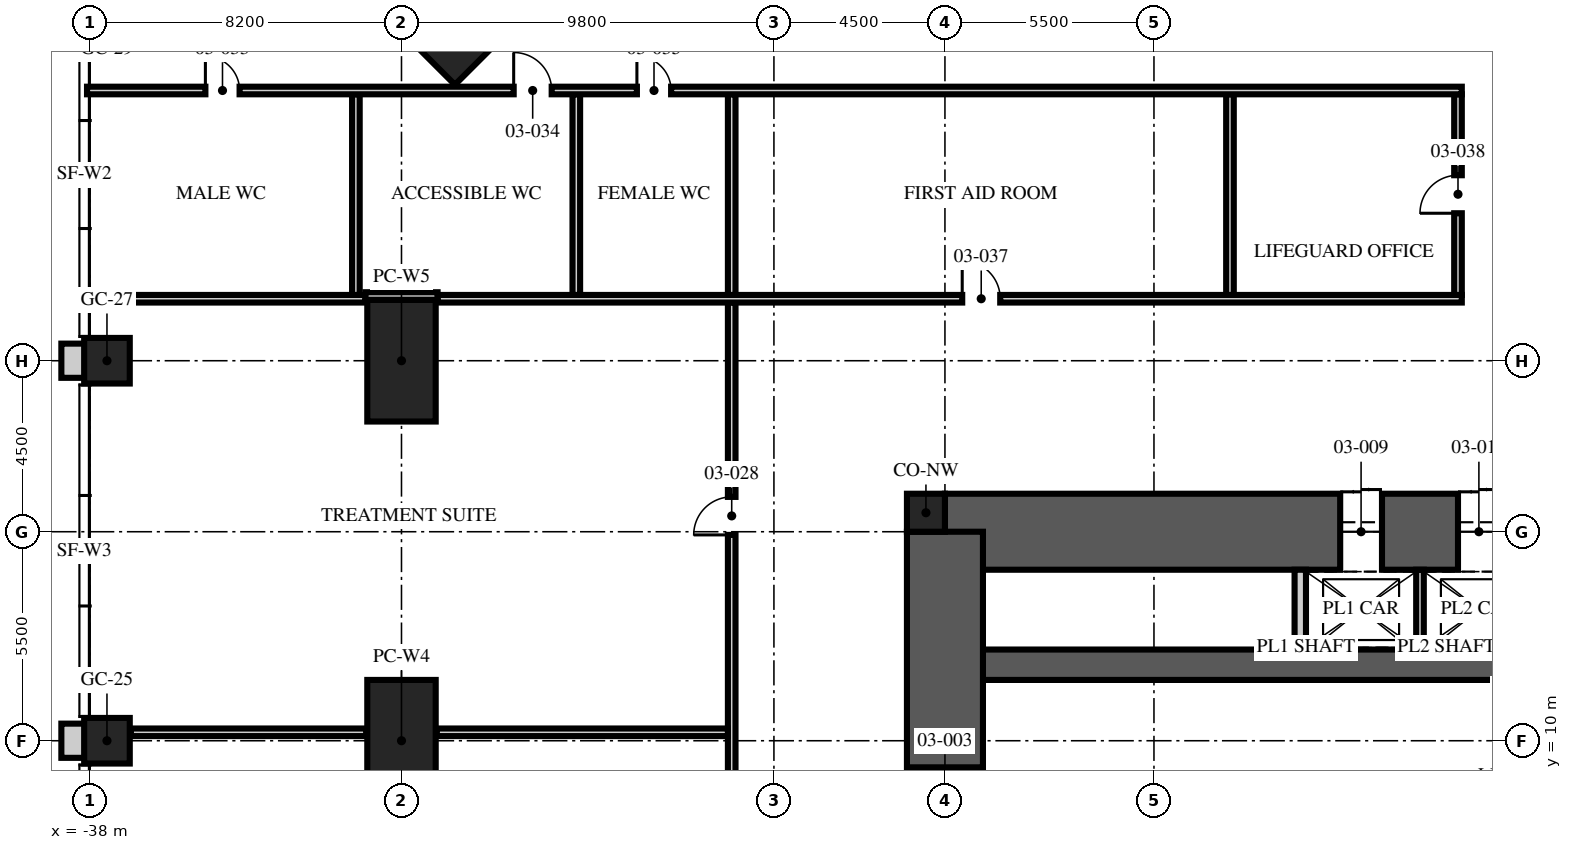
"""IFC4 building model, lengths in metres.
Left out: names, types, materials, properties, quantities, classifications, styles, units other than length and angle.
Written with IfcOpenShell. Run it as: python <this file> out.ifc"""

import sys

from ifc_helpers import new_model, si_unit, direction, frame, frame_2d, origin, origin_2d, place, context, subcontext, project, spatial, rectangle, hollow_rectangle, extrude, element, fill, save


model = new_model("IFC4")
c1 = context("Model", 3, precision=1e-05, world=origin(), true_north=direction((0.0, 1.0)))
c2 = subcontext(c1, "Body", "Model", "MODEL_VIEW")
j1 = project(units=[si_unit("LENGTHUNIT", "METRE"), si_unit("PLANEANGLEUNIT", "RADIAN")], contexts=[c1])
p1 = place(None, origin())
s1 = spatial("IfcSite", under=j1, at=p1, CompositionType="ELEMENT")
p2 = place(p1, origin())
s2 = spatial("IfcBuilding", under=s1, at=p2, CompositionType="ELEMENT")
p3 = place(p2, frame((0.0, 0.0, 16.0)))
s3 = spatial("IfcBuildingStorey", under=s2, at=p3, CompositionType="ELEMENT", Elevation=16.0)
p4 = place(p3, frame((-15.5, 15.5, -0.3), z_axis=(0.0, 0.0, 1.0), x_axis=(1.0, 0.0, 0.0)))
e1 = element("IfcWall", 1, at=p4, inside=s3, PredefinedType="SHEAR", context=c2, shape_type="SweptSolid", body=[
    extrude(rectangle(XDim=31.0, YDim=2.0, at=frame_2d((15.5, 0.0))), origin(), (0.0, 0.0, 1.0), 5.05),
])
p5 = place(p4, frame((10.4, 0.0, 0.3)))
e2 = element("IfcOpeningElement", 2, at=p5, cuts=e1, PredefinedType="OPENING", context=c2, shape_type="SweptSolid", body=[
    extrude(rectangle(XDim=1.1, YDim=2.1, at=frame_2d((0.55, 1.05))), frame((0.0, 1.01, 0.0), z_axis=(0.0, -1.0, 0.0), x_axis=(1.0, 0.0, 0.0)), (0.0, 0.0, 1.0), 2.02),
])
p6 = place(p4, frame((13.5, 0.0, 0.3)))
e3 = element("IfcOpeningElement", 3, at=p6, cuts=e1, PredefinedType="OPENING", context=c2, shape_type="SweptSolid", body=[
    extrude(rectangle(XDim=1.1, YDim=2.1, at=frame_2d((0.55, 1.05))), frame((0.0, 1.01, 0.0), z_axis=(0.0, -1.0, 0.0), x_axis=(1.0, 0.0, 0.0)), (0.0, 0.0, 1.0), 2.02),
])
p7 = place(p4, frame((16.6, 0.0, 0.3)))
e4 = element("IfcOpeningElement", 4, at=p7, cuts=e1, PredefinedType="OPENING", context=c2, shape_type="SweptSolid", body=[
    extrude(rectangle(XDim=1.1, YDim=2.1, at=frame_2d((0.55, 1.05))), frame((0.0, 1.01, 0.0), z_axis=(0.0, -1.0, 0.0), x_axis=(1.0, 0.0, 0.0)), (0.0, 0.0, 1.0), 2.02),
])
p8 = place(p3, frame((-15.5, 12.0, -0.3), z_axis=(0.0, 0.0, 1.0), x_axis=(1.0, 0.0, 0.0)))
e5 = element("IfcWall", 5, at=p8, inside=s3, PredefinedType="SHEAR", context=c2, shape_type="SweptSolid", body=[
    extrude(rectangle(XDim=31.0, YDim=0.8, at=frame_2d((15.5, 0.0))), origin(), (0.0, 0.0, 1.0), 5.05),
])
p9 = place(p3, frame((-15.5, -15.5, -0.3), z_axis=(0.0, 0.0, 1.0), x_axis=(0.0, 1.0, 0.0)))
e6 = element("IfcWall", 6, at=p9, inside=s3, PredefinedType="SHEAR", context=c2, shape_type="SweptSolid", body=[
    extrude(rectangle(XDim=31.0, YDim=2.0, at=frame_2d((15.5, 0.0))), origin(), (0.0, 0.0, 1.0), 5.05),
])
p10 = place(p9, frame((6.5, 0.0, 0.3)))
e7 = element("IfcOpeningElement", 7, at=p10, cuts=e6, PredefinedType="OPENING", context=c2, shape_type="SweptSolid", body=[
    extrude(rectangle(XDim=1.2, YDim=2.1, at=frame_2d((0.6, 1.05))), frame((0.0, 1.01, 0.0), z_axis=(0.0, -1.0, 0.0), x_axis=(1.0, 0.0, 0.0)), (0.0, 0.0, 1.0), 2.02),
])
p11 = place(p9, frame((23.0, 0.0, 0.3)))
e8 = element("IfcOpeningElement", 8, at=p11, cuts=e6, PredefinedType="OPENING", context=c2, shape_type="SweptSolid", body=[
    extrude(rectangle(XDim=1.8, YDim=2.1, at=frame_2d((0.9, 1.05))), frame((0.0, 1.01, 0.0), z_axis=(0.0, -1.0, 0.0), x_axis=(1.0, 0.0, 0.0)), (0.0, 0.0, 1.0), 2.02),
])
p12 = place(p3, frame((-16.0, 16.0, -0.3), z_axis=(0.0, 0.0, 1.0), x_axis=(1.0, 0.0, 0.0)))
e9 = element("IfcColumn", 9, at=p12, inside=s3, PredefinedType="COLUMN", context=c2, shape_type="SweptSolid", body=[
    extrude(rectangle(XDim=1.0, YDim=1.0, at=origin_2d()), origin(), (0.0, 0.0, 1.0), 5.05),
])
for number, where, z_axis, x_axis in (
    (10, (-29.8, 10.0, 0.0), (0.0, 0.0, 1.0), (0.0, 1.0, 0.0)),
    (11, (-29.8, 20.0, 0.0), (0.0, 0.0, 1.0), (0.0, 1.0, 0.0)),
):
    element("IfcColumn", number, at=place(p3, frame(where, z_axis=z_axis, x_axis=x_axis)), inside=s3, PredefinedType="COLUMN", context=c2, shape_type="SweptSolid", body=[
        extrude(hollow_rectangle(XDim=3.2, YDim=1.8, WallThickness=0.2, at=origin_2d()), origin(), (0.0, 0.0, 1.0), 5.0),
    ])
p13 = place(p3, frame((-28.394, 28.394, 0.0), z_axis=(0.0, 0.0, 1.0), x_axis=(0.707106781187, 0.707106781187, 0.0)))
e12 = element("IfcColumn", 12, at=p13, inside=s3, PredefinedType="COLUMN", context=c2, shape_type="SweptSolid", body=[
    extrude(hollow_rectangle(XDim=1.6, YDim=1.6, WallThickness=0.1, at=origin_2d()), origin(), (0.0, 0.0, 1.0), 5.0),
])
for number, where, z_axis, x_axis in (
    (13, (-37.55, 10.0, 0.0), (0.0, 0.0, 1.0), (1.0, 0.0, 0.0)),
    (14, (-37.55, 20.0, 0.0), (0.0, 0.0, 1.0), (1.0, 0.0, 0.0)),
):
    element("IfcColumn", number, at=place(p3, frame(where, z_axis=z_axis, x_axis=x_axis)), inside=s3, PredefinedType="COLUMN", context=c2, shape_type="SweptSolid", body=[
        extrude(rectangle(XDim=1.2, YDim=1.2, at=origin_2d()), origin(), (0.0, 0.0, 1.0), 5.0),
    ])
for number, where, z_axis, x_axis in (
    (15, (-38.375, 20.45, 0.0), (0.0, 0.0, 1.0), (0.0, -1.0, 0.0)),
    (16, (-38.375, 10.45, 0.0), (0.0, 0.0, 1.0), (0.0, -1.0, 0.0)),
):
    element("IfcWall", number, at=place(p3, frame(where, z_axis=z_axis, x_axis=x_axis)), inside=s3, PredefinedType="SOLIDWALL", context=c2, shape_type="SweptSolid", body=[
        extrude(rectangle(XDim=0.9, YDim=0.75, at=frame_2d((0.45, 0.0))), origin(), (0.0, 0.0, 1.0), 5.0),
    ])
p14 = place(p3, frame((-6.15, 12.4, 0.0), z_axis=(0.0, 0.0, 1.0), x_axis=(0.0, 1.0, 0.0)))
e17 = element("IfcWall", 17, at=p14, inside=s3, PredefinedType="PARTITIONING", context=c2, shape_type="SweptSolid", body=[
    extrude(rectangle(XDim=2.1, YDim=0.3, at=frame_2d((1.05, 0.0))), origin(), (0.0, 0.0, 1.0), 4.75),
])
p15 = place(p3, frame((-3.0, 12.4, 0.0), z_axis=(0.0, 0.0, 1.0), x_axis=(0.0, 1.0, 0.0)))
e18 = element("IfcWall", 18, at=p15, inside=s3, PredefinedType="PARTITIONING", context=c2, shape_type="SweptSolid", body=[
    extrude(rectangle(XDim=2.1, YDim=0.2, at=frame_2d((1.05, 0.0))), origin(), (0.0, 0.0, 1.0), 4.75),
])
p16 = place(p3, frame((-21.111, -20.491, 0.0), z_axis=(0.0, 0.0, 1.0), x_axis=(0.0, 1.0, 0.0)))
e19 = element("IfcWall", 19, at=p16, inside=s3, PredefinedType="SOLIDWALL", context=c2, shape_type="SweptSolid", body=[
    extrude(rectangle(XDim=42.022, YDim=0.2, at=frame_2d((21.011, 0.0))), origin(), (0.0, 0.0, 1.0), 3.55),
])
p17 = place(p16, frame((3.613, 0.0, 0.0)))
e20 = element("IfcOpeningElement", 20, at=p17, cuts=e19, PredefinedType="OPENING", context=c2, shape_type="SweptSolid", body=[
    extrude(rectangle(XDim=1.0, YDim=2.1, at=frame_2d((0.5, 1.05))), frame((0.0, 0.11, 0.0), z_axis=(0.0, -1.0, 0.0), x_axis=(1.0, 0.0, 0.0)), (0.0, 0.0, 1.0), 0.22),
])
p18 = place(p16, frame((13.314, 0.0, 0.0)))
e21 = element("IfcOpeningElement", 21, at=p18, cuts=e19, PredefinedType="OPENING", context=c2, shape_type="SweptSolid", body=[
    extrude(rectangle(XDim=1.0, YDim=2.1, at=frame_2d((0.5, 1.05))), frame((0.0, 0.11, 0.0), z_axis=(0.0, -1.0, 0.0), x_axis=(1.0, 0.0, 0.0)), (0.0, 0.0, 1.0), 0.22),
])
p19 = place(p16, frame((24.499, 0.0, 0.0)))
e22 = element("IfcOpeningElement", 22, at=p19, cuts=e19, PredefinedType="OPENING", context=c2, shape_type="SweptSolid", body=[
    extrude(rectangle(XDim=1.0, YDim=2.1, at=frame_2d((0.5, 1.05))), frame((0.0, 0.11, 0.0), z_axis=(0.0, -1.0, 0.0), x_axis=(1.0, 0.0, 0.0)), (0.0, 0.0, 1.0), 0.22),
])
p20 = place(p16, frame((35.907, 0.0, 0.0)))
e23 = element("IfcOpeningElement", 23, at=p20, cuts=e19, PredefinedType="OPENING", context=c2, shape_type="SweptSolid", body=[
    extrude(rectangle(XDim=1.0, YDim=2.1, at=frame_2d((0.5, 1.05))), frame((0.0, 0.11, 0.0), z_axis=(0.0, -1.0, 0.0), x_axis=(1.0, 0.0, 0.0)), (0.0, 0.0, 1.0), 0.22),
])
p21 = place(p3, frame((-36.92, 10.222, 0.0), z_axis=(0.0, 0.0, 1.0), x_axis=(1.0, 0.0, 0.0)))
e24 = element("IfcWall", 24, at=p21, inside=s3, PredefinedType="SOLIDWALL", context=c2, shape_type="SweptSolid", body=[
    extrude(rectangle(XDim=6.19, YDim=0.2, at=frame_2d((3.095, 0.0))), origin(), (0.0, 0.0, 1.0), 3.65),
])
p22 = place(p3, frame((-28.87, 10.222, 0.0), z_axis=(0.0, 0.0, 1.0), x_axis=(1.0, 0.0, 0.0)))
e25 = element("IfcWall", 25, at=p22, inside=s3, PredefinedType="SOLIDWALL", context=c2, shape_type="SweptSolid", body=[
    extrude(rectangle(XDim=7.659, YDim=0.2, at=frame_2d((3.83, 0.0))), origin(), (0.0, 0.0, 1.0), 3.742),
])
p23 = place(p3, frame((-38.075, 21.631, 0.0), z_axis=(0.0, 0.0, 1.0), x_axis=(1.0, 0.0, 0.0)))
e26 = element("IfcWall", 26, at=p23, inside=s3, PredefinedType="SOLIDWALL", context=c2, shape_type="SweptSolid", body=[
    extrude(rectangle(XDim=7.325, YDim=0.2, at=frame_2d((3.663, 0.0))), origin(), (0.0, 0.0, 1.0), 3.65),
])
p24 = place(p3, frame((-28.85, 21.631, 0.0), z_axis=(0.0, 0.0, 1.0), x_axis=(1.0, 0.0, 0.0)))
e27 = element("IfcWall", 27, at=p24, inside=s3, PredefinedType="SOLIDWALL", context=c2, shape_type="SweptSolid", body=[
    extrude(rectangle(XDim=26.95, YDim=0.2, at=frame_2d((13.475, 0.0))), origin(), (0.0, 0.0, 1.0), 3.55),
])
p25 = place(p24, frame((13.804, 0.0, 0.0)))
e28 = element("IfcOpeningElement", 28, at=p25, cuts=e27, PredefinedType="OPENING", context=c2, shape_type="SweptSolid", body=[
    extrude(rectangle(XDim=1.0, YDim=2.1, at=frame_2d((0.5, 1.05))), frame((0.0, 0.11, 0.0), z_axis=(0.0, -1.0, 0.0), x_axis=(1.0, 0.0, 0.0)), (0.0, 0.0, 1.0), 0.22),
])
p26 = place(p3, frame((-30.75, 21.702, 0.0), z_axis=(0.0, 0.0, 1.0), x_axis=(1.0, 0.0, 0.0)))
e29 = element("IfcWall", 29, at=p26, inside=s3, PredefinedType="SOLIDWALL", context=c2, shape_type="SweptSolid", body=[
    extrude(rectangle(XDim=1.9, YDim=0.2, at=frame_2d((0.95, 0.0))), origin(), (0.0, 0.0, 1.0), 3.96),
])
p27 = place(p3, frame((-31.0, 21.731, 0.0), z_axis=(0.0, 0.0, 1.0), x_axis=(0.0, 1.0, 0.0)))
e30 = element("IfcWall", 30, at=p27, inside=s3, PredefinedType="SOLIDWALL", context=c2, shape_type="SweptSolid", body=[
    extrude(rectangle(XDim=5.28, YDim=0.2, at=frame_2d((2.64, 0.0))), origin(), (0.0, 0.0, 1.0), 4.75),
])
p28 = place(p3, frame((-25.2, 21.731, 0.0), z_axis=(0.0, 0.0, 1.0), x_axis=(0.0, 1.0, 0.0)))
e31 = element("IfcWall", 31, at=p28, inside=s3, PredefinedType="SOLIDWALL", context=c2, shape_type="SweptSolid", body=[
    extrude(rectangle(XDim=5.28, YDim=0.2, at=frame_2d((2.64, 0.0))), origin(), (0.0, 0.0, 1.0), 3.55),
])
for number, where, z_axis, x_axis in (
    (32, (-21.111, 21.731, 0.0), (0.0, 0.0, 1.0), (0.0, 1.0, 0.0)),
    (33, (-8.0, 21.731, 0.0), (0.0, 0.0, 1.0), (0.0, 1.0, 0.0)),
):
    element("IfcWall", number, at=place(p3, frame(where, z_axis=z_axis, x_axis=x_axis)), inside=s3, PredefinedType="SOLIDWALL", context=c2, shape_type="SweptSolid", body=[
        extrude(rectangle(XDim=5.28, YDim=0.2, at=frame_2d((2.64, 0.0))), origin(), (0.0, 0.0, 1.0), 4.75),
    ])
p29 = place(p3, frame((-2.0, 21.731, 0.0), z_axis=(0.0, 0.0, 1.0), x_axis=(0.0, 1.0, 0.0)))
e34 = element("IfcWall", 34, at=p29, inside=s3, PredefinedType="SOLIDWALL", context=c2, shape_type="SweptSolid", body=[
    extrude(rectangle(XDim=5.28, YDim=0.2, at=frame_2d((2.64, 0.0))), origin(), (0.0, 0.0, 1.0), 4.75),
])
p30 = place(p29, frame((2.15, 0.0, 0.0)))
e35 = element("IfcOpeningElement", 35, at=p30, cuts=e34, PredefinedType="OPENING", context=c2, shape_type="SweptSolid", body=[
    extrude(rectangle(XDim=1.0, YDim=2.1, at=frame_2d((0.5, 1.05))), frame((0.0, 0.11, 0.0), z_axis=(0.0, -1.0, 0.0), x_axis=(1.0, 0.0, 0.0)), (0.0, 0.0, 1.0), 0.22),
])
p31 = place(p3, frame((-38.075, 27.111, 0.0), z_axis=(0.0, 0.0, 1.0), x_axis=(1.0, 0.0, 0.0)))
e36 = element("IfcWall", 36, at=p31, inside=s3, PredefinedType="SOLIDWALL", context=c2, shape_type="SweptSolid", body=[
    extrude(rectangle(XDim=36.175, YDim=0.2, at=frame_2d((18.087, 0.0))), origin(), (0.0, 0.0, 1.0), 3.55),
])
p32 = place(p31, frame((3.115, 0.0, 0.0)))
e37 = element("IfcOpeningElement", 37, at=p32, cuts=e36, PredefinedType="OPENING", context=c2, shape_type="SweptSolid", body=[
    extrude(rectangle(XDim=0.9, YDim=2.1, at=frame_2d((0.45, 1.05))), frame((0.0, 0.11, 0.0), z_axis=(0.0, -1.0, 0.0), x_axis=(1.0, 0.0, 0.0)), (0.0, 0.0, 1.0), 0.22),
])
p33 = place(p31, frame((11.227, 0.0, 0.0)))
e38 = element("IfcOpeningElement", 38, at=p33, cuts=e36, PredefinedType="OPENING", context=c2, shape_type="SweptSolid", body=[
    extrude(rectangle(XDim=1.0, YDim=2.1, at=frame_2d((0.5, 1.05))), frame((0.0, 0.11, 0.0), z_axis=(0.0, -1.0, 0.0), x_axis=(1.0, 0.0, 0.0)), (0.0, 0.0, 1.0), 0.22),
])
p34 = place(p31, frame((14.469, 0.0, 0.0)))
e39 = element("IfcOpeningElement", 39, at=p34, cuts=e36, PredefinedType="OPENING", context=c2, shape_type="SweptSolid", body=[
    extrude(rectangle(XDim=0.9, YDim=2.1, at=frame_2d((0.45, 1.05))), frame((0.0, 0.11, 0.0), z_axis=(0.0, -1.0, 0.0), x_axis=(1.0, 0.0, 0.0)), (0.0, 0.0, 1.0), 0.22),
])
p35 = place(p11, origin())
e40 = element("IfcDoor", 40, at=p35, inside=s3, OperationType="DOUBLE_DOOR_SINGLE_SWING", PredefinedType="DOOR", context=c2, shape_type="SweptSolid", body=[
    extrude(rectangle(XDim=1.8, YDim=2.1, at=frame_2d((0.9, 1.05))), frame((0.0, 0.025, 0.0), z_axis=(0.0, -1.0, 0.0), x_axis=(1.0, 0.0, 0.0)), (0.0, 0.0, 1.0), 0.05),
])
fill(e8, e40)
p36 = place(p5, origin())
e41 = element("IfcDoor", 41, at=p36, inside=s3, OperationType="DOUBLE_DOOR_SLIDING", PredefinedType="DOOR", context=c2, shape_type="SweptSolid", body=[
    extrude(rectangle(XDim=1.1, YDim=2.1, at=frame_2d((0.55, 1.05))), frame((0.0, 0.025, 0.0), z_axis=(0.0, -1.0, 0.0), x_axis=(1.0, 0.0, 0.0)), (0.0, 0.0, 1.0), 0.05),
])
fill(e2, e41)
p37 = place(p6, origin())
e42 = element("IfcDoor", 42, at=p37, inside=s3, OperationType="DOUBLE_DOOR_SLIDING", PredefinedType="DOOR", context=c2, shape_type="SweptSolid", body=[
    extrude(rectangle(XDim=1.1, YDim=2.1, at=frame_2d((0.55, 1.05))), frame((0.0, 0.025, 0.0), z_axis=(0.0, -1.0, 0.0), x_axis=(1.0, 0.0, 0.0)), (0.0, 0.0, 1.0), 0.05),
])
fill(e3, e42)
p38 = place(p20, origin())
e43 = element("IfcDoor", 43, at=p38, inside=s3, OperationType="SINGLE_SWING_LEFT", PredefinedType="DOOR", context=c2, shape_type="SweptSolid", body=[
    extrude(rectangle(XDim=1.0, YDim=2.1, at=frame_2d((0.5, 1.05))), frame((0.0, 0.025, 0.0), z_axis=(0.0, -1.0, 0.0), x_axis=(1.0, 0.0, 0.0)), (0.0, 0.0, 1.0), 0.05),
])
fill(e23, e43)
p39 = place(p32, origin())
e44 = element("IfcDoor", 44, at=p39, inside=s3, OperationType="SINGLE_SWING_LEFT", PredefinedType="DOOR", context=c2, shape_type="SweptSolid", body=[
    extrude(rectangle(XDim=0.9, YDim=2.1, at=frame_2d((0.45, 1.05))), frame((0.0, 0.025, 0.0), z_axis=(0.0, -1.0, 0.0), x_axis=(1.0, 0.0, 0.0)), (0.0, 0.0, 1.0), 0.05),
])
fill(e37, e44)
p40 = place(p33, origin())
e45 = element("IfcDoor", 45, at=p40, inside=s3, OperationType="SINGLE_SWING_LEFT", PredefinedType="DOOR", context=c2, shape_type="SweptSolid", body=[
    extrude(rectangle(XDim=1.0, YDim=2.1, at=frame_2d((0.5, 1.05))), frame((0.0, 0.025, 0.0), z_axis=(0.0, -1.0, 0.0), x_axis=(1.0, 0.0, 0.0)), (0.0, 0.0, 1.0), 0.05),
])
fill(e38, e45)
p41 = place(p34, origin())
e46 = element("IfcDoor", 46, at=p41, inside=s3, OperationType="SINGLE_SWING_LEFT", PredefinedType="DOOR", context=c2, shape_type="SweptSolid", body=[
    extrude(rectangle(XDim=0.9, YDim=2.1, at=frame_2d((0.45, 1.05))), frame((0.0, 0.025, 0.0), z_axis=(0.0, -1.0, 0.0), x_axis=(1.0, 0.0, 0.0)), (0.0, 0.0, 1.0), 0.05),
])
fill(e39, e46)
p42 = place(p25, origin())
e47 = element("IfcDoor", 47, at=p42, inside=s3, OperationType="SINGLE_SWING_LEFT", PredefinedType="DOOR", context=c2, shape_type="SweptSolid", body=[
    extrude(rectangle(XDim=1.0, YDim=2.1, at=frame_2d((0.5, 1.05))), frame((0.0, 0.025, 0.0), z_axis=(0.0, -1.0, 0.0), x_axis=(1.0, 0.0, 0.0)), (0.0, 0.0, 1.0), 0.05),
])
fill(e28, e47)
p43 = place(p30, origin())
e48 = element("IfcDoor", 48, at=p43, inside=s3, OperationType="SINGLE_SWING_LEFT", PredefinedType="DOOR", context=c2, shape_type="SweptSolid", body=[
    extrude(rectangle(XDim=1.0, YDim=2.1, at=frame_2d((0.5, 1.05))), frame((0.0, 0.025, 0.0), z_axis=(0.0, -1.0, 0.0), x_axis=(1.0, 0.0, 0.0)), (0.0, 0.0, 1.0), 0.05),
])
fill(e35, e48)
save(model, sys.argv[1])
